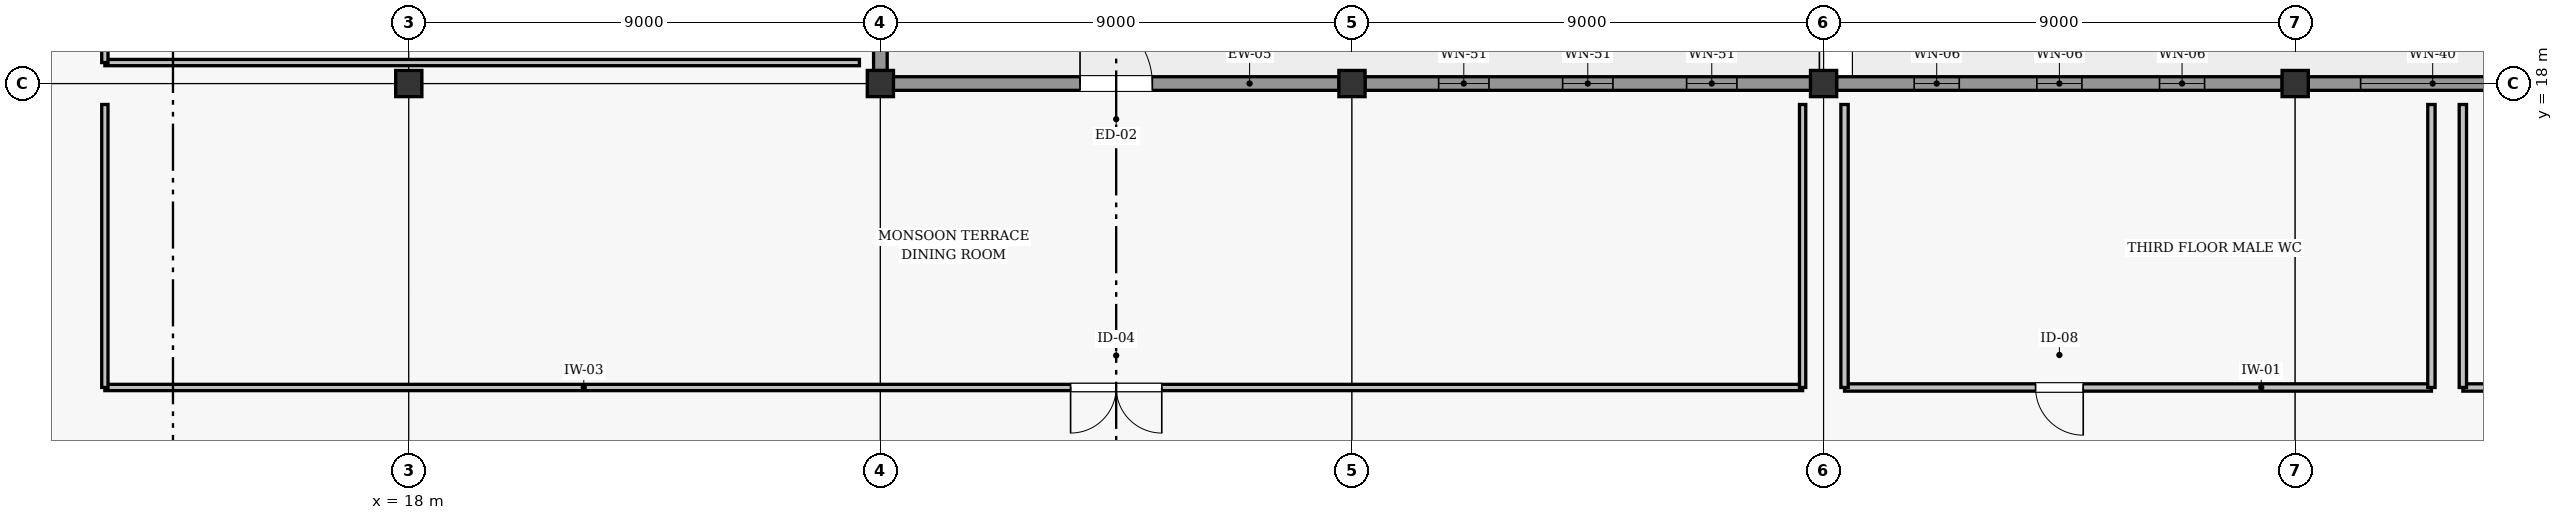
"""IFC4 building model, lengths in metres.
Left out: names, types, materials, properties, quantities, classifications, styles, units other than length and angle.
Written with IfcOpenShell. Run it as: python <this file> out.ifc"""

import sys

from ifc_helpers import new_model, si_unit, direction, frame, frame_2d, origin, origin_2d, place, context, subcontext, project, spatial, rectangle, extrude, element, fill, save


model = new_model("IFC4")
c1 = context("Model", 3, precision=1e-05, world=origin(), true_north=direction((0.0, 1.0)))
c2 = subcontext(c1, "Body", "Model", "MODEL_VIEW")
j1 = project(units=[si_unit("LENGTHUNIT", "METRE"), si_unit("PLANEANGLEUNIT", "RADIAN")], contexts=[c1])
p1 = place(None, origin())
s1 = spatial("IfcSite", under=j1, at=p1, CompositionType="ELEMENT")
p2 = place(p1, origin())
s2 = spatial("IfcBuilding", under=s1, at=p2, CompositionType="ELEMENT")
p3 = place(p2, frame((0.0, 0.0, 12.0)))
s3 = spatial("IfcBuildingStorey", under=s2, at=p3, CompositionType="ELEMENT", Elevation=12.0)
for number, where, z_axis, x_axis in (
    (1, (18.0, 18.0, 0.0), (0.0, 0.0, 1.0), (1.0, 0.0, 0.0)),
    (2, (27.0, 18.0, 0.0), (0.0, 0.0, 1.0), (1.0, 0.0, 0.0)),
    (3, (36.0, 18.0, 0.0), (0.0, 0.0, 1.0), (1.0, 0.0, 0.0)),
    (4, (45.0, 18.0, 0.0), (0.0, 0.0, 1.0), (1.0, 0.0, 0.0)),
    (5, (54.0, 18.0, 0.0), (0.0, 0.0, 1.0), (1.0, 0.0, 0.0)),
):
    element("IfcColumn", number, at=place(p3, frame(where, z_axis=z_axis, x_axis=x_axis)), inside=s3, PredefinedType="COLUMN", context=c2, shape_type="SweptSolid", body=[
        extrude(rectangle(XDim=0.5, YDim=0.5, at=origin_2d()), origin(), (0.0, 0.0, 1.0), 3.0),
    ])
p4 = place(p3, frame((27.248, 18.0, 0.0), z_axis=(0.0, 0.0, 1.0), x_axis=(1.0, 0.0, 0.0)))
e6 = element("IfcWall", 6, at=p4, inside=s3, PredefinedType="SOLIDWALL", context=c2, shape_type="SweptSolid", body=[
    extrude(rectangle(XDim=8.504, YDim=0.26, at=frame_2d((4.252, 0.0))), origin(), (0.0, 0.0, 1.0), 2.262),
])
p5 = place(p4, frame((3.562, 0.0, 0.0)))
e7 = element("IfcOpeningElement", 7, at=p5, cuts=e6, PredefinedType="OPENING", context=c2, shape_type="SweptSolid", body=[
    extrude(rectangle(XDim=1.38, YDim=2.04, at=frame_2d((0.69, 1.02))), frame((0.0, 0.14, 0.0), z_axis=(0.0, -1.0, 0.0), x_axis=(1.0, 0.0, 0.0)), (0.0, 0.0, 1.0), 0.28),
])
p6 = place(p3, frame((36.248, 18.0, 0.0), z_axis=(0.0, 0.0, 1.0), x_axis=(1.0, 0.0, 0.0)))
e8 = element("IfcWall", 8, at=p6, inside=s3, PredefinedType="SOLIDWALL", context=c2, shape_type="SweptSolid", body=[
    extrude(rectangle(XDim=8.504, YDim=0.26, at=frame_2d((4.252, 0.0))), origin(), (0.0, 0.0, 1.0), 2.262),
])
p7 = place(p6, frame((1.406, 0.0, 0.8)))
e9 = element("IfcOpeningElement", 9, at=p7, cuts=e8, PredefinedType="OPENING", context=c2, shape_type="SweptSolid", body=[
    extrude(rectangle(XDim=0.96, YDim=1.04, at=frame_2d((0.48, 0.52))), frame((0.0, 0.14, 0.0), z_axis=(0.0, -1.0, 0.0), x_axis=(1.0, 0.0, 0.0)), (0.0, 0.0, 1.0), 0.28),
])
p8 = place(p6, frame((3.772, 0.0, 0.8)))
e10 = element("IfcOpeningElement", 10, at=p8, cuts=e8, PredefinedType="OPENING", context=c2, shape_type="SweptSolid", body=[
    extrude(rectangle(XDim=0.96, YDim=1.04, at=frame_2d((0.48, 0.52))), frame((0.0, 0.14, 0.0), z_axis=(0.0, -1.0, 0.0), x_axis=(1.0, 0.0, 0.0)), (0.0, 0.0, 1.0), 0.28),
])
p9 = place(p6, frame((6.138, 0.0, 0.8)))
e11 = element("IfcOpeningElement", 11, at=p9, cuts=e8, PredefinedType="OPENING", context=c2, shape_type="SweptSolid", body=[
    extrude(rectangle(XDim=0.96, YDim=1.04, at=frame_2d((0.48, 0.52))), frame((0.0, 0.14, 0.0), z_axis=(0.0, -1.0, 0.0), x_axis=(1.0, 0.0, 0.0)), (0.0, 0.0, 1.0), 0.28),
])
p10 = place(p3, frame((45.248, 18.0, 0.0), z_axis=(0.0, 0.0, 1.0), x_axis=(1.0, 0.0, 0.0)))
e12 = element("IfcWall", 12, at=p10, inside=s3, PredefinedType="SOLIDWALL", context=c2, shape_type="SweptSolid", body=[
    extrude(rectangle(XDim=8.504, YDim=0.26, at=frame_2d((4.252, 0.0))), origin(), (0.0, 0.0, 1.0), 2.262),
])
p11 = place(p10, frame((1.481, 0.0, 0.85)))
e13 = element("IfcOpeningElement", 13, at=p11, cuts=e12, PredefinedType="OPENING", context=c2, shape_type="SweptSolid", body=[
    extrude(rectangle(XDim=0.86, YDim=0.98, at=frame_2d((0.43, 0.49))), frame((0.0, 0.14, 0.0), z_axis=(0.0, -1.0, 0.0), x_axis=(1.0, 0.0, 0.0)), (0.0, 0.0, 1.0), 0.28),
])
p12 = place(p10, frame((3.822, 0.0, 0.85)))
e14 = element("IfcOpeningElement", 14, at=p12, cuts=e12, PredefinedType="OPENING", context=c2, shape_type="SweptSolid", body=[
    extrude(rectangle(XDim=0.86, YDim=0.98, at=frame_2d((0.43, 0.49))), frame((0.0, 0.14, 0.0), z_axis=(0.0, -1.0, 0.0), x_axis=(1.0, 0.0, 0.0)), (0.0, 0.0, 1.0), 0.28),
])
p13 = place(p10, frame((6.163, 0.0, 0.85)))
e15 = element("IfcOpeningElement", 15, at=p13, cuts=e12, PredefinedType="OPENING", context=c2, shape_type="SweptSolid", body=[
    extrude(rectangle(XDim=0.86, YDim=0.98, at=frame_2d((0.43, 0.49))), frame((0.0, 0.14, 0.0), z_axis=(0.0, -1.0, 0.0), x_axis=(1.0, 0.0, 0.0)), (0.0, 0.0, 1.0), 0.28),
])
p14 = place(p3, frame((54.248, 18.0, 0.0), z_axis=(0.0, 0.0, 1.0), x_axis=(1.0, 0.0, 0.0)))
e16 = element("IfcWall", 16, at=p14, inside=s3, PredefinedType="SOLIDWALL", context=c2, shape_type="SweptSolid", body=[
    extrude(rectangle(XDim=8.504, YDim=0.26, at=frame_2d((4.252, 0.0))), origin(), (0.0, 0.0, 1.0), 2.322),
])
p15 = place(p14, frame((1.001, 0.0, 0.86)))
e17 = element("IfcOpeningElement", 17, at=p15, cuts=e16, PredefinedType="OPENING", context=c2, shape_type="SweptSolid", body=[
    extrude(rectangle(XDim=2.75, YDim=1.28, at=frame_2d((1.375, 0.64))), frame((0.0, 0.14, 0.0), z_axis=(0.0, -1.0, 0.0), x_axis=(1.0, 0.0, 0.0)), (0.0, 0.0, 1.0), 0.28),
])
p16 = place(p14, frame((4.753, 0.0, 0.86)))
e18 = element("IfcOpeningElement", 18, at=p16, cuts=e16, PredefinedType="OPENING", context=c2, shape_type="SweptSolid", body=[
    extrude(rectangle(XDim=2.75, YDim=1.28, at=frame_2d((1.375, 0.64))), frame((0.0, 0.14, 0.0), z_axis=(0.0, -1.0, 0.0), x_axis=(1.0, 0.0, 0.0)), (0.0, 0.0, 1.0), 0.28),
])
p17 = place(p3, frame((27.0, 18.248, 0.0), z_axis=(0.0, 0.0, 1.0), x_axis=(0.0, 1.0, 0.0)))
e19 = element("IfcWall", 19, at=p17, inside=s3, PredefinedType="SOLIDWALL", context=c2, shape_type="SweptSolid", body=[
    extrude(rectangle(XDim=8.504, YDim=0.26, at=frame_2d((4.252, 0.0))), origin(), (0.0, 0.0, 1.0), 2.302),
])
p18 = place(p17, frame((1.781, 0.0, 0.52)))
e20 = element("IfcOpeningElement", 20, at=p18, cuts=e19, PredefinedType="OPENING", context=c2, shape_type="SweptSolid", body=[
    extrude(rectangle(XDim=1.58, YDim=1.6, at=frame_2d((0.79, 0.8))), frame((0.0, 0.14, 0.0), z_axis=(0.0, -1.0, 0.0), x_axis=(1.0, 0.0, 0.0)), (0.0, 0.0, 1.0), 0.28),
])
p19 = place(p17, frame((5.143, 0.0, 0.52)))
e21 = element("IfcOpeningElement", 21, at=p19, cuts=e19, PredefinedType="OPENING", context=c2, shape_type="SweptSolid", body=[
    extrude(rectangle(XDim=1.58, YDim=1.6, at=frame_2d((0.79, 0.8))), frame((0.0, 0.14, 0.0), z_axis=(0.0, -1.0, 0.0), x_axis=(1.0, 0.0, 0.0)), (0.0, 0.0, 1.0), 0.28),
])
p20 = place(p3, frame((12.2, 12.2, 0.0), z_axis=(0.0, 0.0, 1.0), x_axis=(1.0, 0.0, 0.0)))
e22 = element("IfcWall", 22, at=p20, inside=s3, PredefinedType="PARTITIONING", context=c2, shape_type="SweptSolid", body=[
    extrude(rectangle(XDim=32.4, YDim=0.12, at=frame_2d((16.2, 0.0))), origin(), (0.0, 0.0, 1.0), 2.295),
])
p21 = place(p20, frame((18.43, 0.0, 0.0)))
e23 = element("IfcOpeningElement", 23, at=p21, cuts=e22, PredefinedType="OPENING", context=c2, shape_type="SweptSolid", body=[
    extrude(rectangle(XDim=1.74, YDim=2.18, at=frame_2d((0.87, 1.09))), frame((0.0, 0.07, 0.0), z_axis=(0.0, -1.0, 0.0), x_axis=(1.0, 0.0, 0.0)), (0.0, 0.0, 1.0), 0.14),
])
for number, where, z_axis, x_axis in (
    (24, (12.2, 12.2, 0.0), (0.0, 0.0, 1.0), (0.0, 1.0, 0.0)),
    (25, (44.6, 12.2, 0.0), (0.0, 0.0, 1.0), (0.0, 1.0, 0.0)),
):
    element("IfcWall", number, at=place(p3, frame(where, z_axis=z_axis, x_axis=x_axis)), inside=s3, PredefinedType="PARTITIONING", context=c2, shape_type="SweptSolid", body=[
        extrude(rectangle(XDim=5.4, YDim=0.12, at=frame_2d((2.7, 0.0))), origin(), (0.0, 0.0, 1.0), 2.75),
    ])
p22 = place(p3, frame((45.4, 12.2, 0.0), z_axis=(0.0, 0.0, 1.0), x_axis=(1.0, 0.0, 0.0)))
e26 = element("IfcWall", 26, at=p22, inside=s3, PredefinedType="PARTITIONING", context=c2, shape_type="SweptSolid", body=[
    extrude(rectangle(XDim=11.2, YDim=0.14, at=frame_2d((5.6, 0.0))), origin(), (0.0, 0.0, 1.0), 2.295),
])
p23 = place(p22, frame((3.645, 0.0, 0.0)))
e27 = element("IfcOpeningElement", 27, at=p23, cuts=e26, PredefinedType="OPENING", context=c2, shape_type="SweptSolid", body=[
    extrude(rectangle(XDim=0.91, YDim=2.04, at=frame_2d((0.455, 1.02))), frame((0.0, 0.08, 0.0), z_axis=(0.0, -1.0, 0.0), x_axis=(1.0, 0.0, 0.0)), (0.0, 0.0, 1.0), 0.16),
])
for number, where, z_axis, x_axis in (
    (28, (45.4, 12.2, 0.0), (0.0, 0.0, 1.0), (0.0, 1.0, 0.0)),
    (29, (56.6, 12.2, 0.0), (0.0, 0.0, 1.0), (0.0, 1.0, 0.0)),
):
    element("IfcWall", number, at=place(p3, frame(where, z_axis=z_axis, x_axis=x_axis)), inside=s3, PredefinedType="PARTITIONING", context=c2, shape_type="SweptSolid", body=[
        extrude(rectangle(XDim=5.4, YDim=0.14, at=frame_2d((2.7, 0.0))), origin(), (0.0, 0.0, 1.0), 2.75),
    ])
p24 = place(p3, frame((57.2, 12.2, 0.0), z_axis=(0.0, 0.0, 1.0), x_axis=(1.0, 0.0, 0.0)))
e30 = element("IfcWall", 30, at=p24, inside=s3, PredefinedType="PARTITIONING", context=c2, shape_type="SweptSolid", body=[
    extrude(rectangle(XDim=11.4, YDim=0.14, at=frame_2d((5.7, 0.0))), origin(), (0.0, 0.0, 1.0), 2.355),
])
p25 = place(p24, frame((2.845, 0.0, 0.0)))
e31 = element("IfcOpeningElement", 31, at=p25, cuts=e30, PredefinedType="OPENING", context=c2, shape_type="SweptSolid", body=[
    extrude(rectangle(XDim=0.91, YDim=2.04, at=frame_2d((0.455, 1.02))), frame((0.0, 0.08, 0.0), z_axis=(0.0, -1.0, 0.0), x_axis=(1.0, 0.0, 0.0)), (0.0, 0.0, 1.0), 0.16),
])
p26 = place(p3, frame((57.2, 12.2, 0.0), z_axis=(0.0, 0.0, 1.0), x_axis=(0.0, 1.0, 0.0)))
e32 = element("IfcWall", 32, at=p26, inside=s3, PredefinedType="PARTITIONING", context=c2, shape_type="SweptSolid", body=[
    extrude(rectangle(XDim=5.4, YDim=0.14, at=frame_2d((2.7, 0.0))), origin(), (0.0, 0.0, 1.0), 2.75),
])
p27 = place(p3, frame((12.2, 18.4, 0.0), z_axis=(0.0, 0.0, 1.0), x_axis=(1.0, 0.0, 0.0)))
e33 = element("IfcWall", 33, at=p27, inside=s3, PredefinedType="PARTITIONING", context=c2, shape_type="SweptSolid", body=[
    extrude(rectangle(XDim=14.4, YDim=0.12, at=frame_2d((7.2, 0.0))), origin(), (0.0, 0.0, 1.0), 2.245),
])
p28 = place(p3, frame((12.2, 18.4, 0.0), z_axis=(0.0, 0.0, 1.0), x_axis=(0.0, 1.0, 0.0)))
e34 = element("IfcWall", 34, at=p28, inside=s3, PredefinedType="PARTITIONING", context=c2, shape_type="SweptSolid", body=[
    extrude(rectangle(XDim=8.2, YDim=0.12, at=frame_2d((4.1, 0.0))), origin(), (0.0, 0.0, 1.0), 2.75),
])
p29 = place(p28, frame((3.61, 0.0, 0.0)))
e35 = element("IfcOpeningElement", 35, at=p29, cuts=e34, PredefinedType="OPENING", context=c2, shape_type="SweptSolid", body=[
    extrude(rectangle(XDim=0.98, YDim=2.08, at=frame_2d((0.49, 1.04))), frame((0.0, 0.07, 0.0), z_axis=(0.0, -1.0, 0.0), x_axis=(1.0, 0.0, 0.0)), (0.0, 0.0, 1.0), 0.14),
])
p30 = place(p5, origin())
e36 = element("IfcDoor", 36, at=p30, inside=s3, OperationType="SINGLE_SWING_LEFT", PredefinedType="DOOR", context=c2, shape_type="SweptSolid", body=[
    extrude(rectangle(XDim=1.38, YDim=2.04, at=frame_2d((0.69, 1.02))), frame((0.0, 0.025, 0.0), z_axis=(0.0, -1.0, 0.0), x_axis=(1.0, 0.0, 0.0)), (0.0, 0.0, 1.0), 0.05),
])
fill(e7, e36)
p31 = place(p7, origin())
e37 = element("IfcWindow", 37, at=p31, inside=s3, PartitioningType="SINGLE_PANEL", PredefinedType="WINDOW", context=c2, shape_type="SweptSolid", body=[
    extrude(rectangle(XDim=0.96, YDim=1.04, at=frame_2d((0.48, 0.52))), frame((0.0, 0.03, 0.0), z_axis=(0.0, -1.0, 0.0), x_axis=(1.0, 0.0, 0.0)), (0.0, 0.0, 1.0), 0.06),
])
fill(e9, e37)
p32 = place(p8, origin())
e38 = element("IfcWindow", 38, at=p32, inside=s3, PartitioningType="SINGLE_PANEL", PredefinedType="WINDOW", context=c2, shape_type="SweptSolid", body=[
    extrude(rectangle(XDim=0.96, YDim=1.04, at=frame_2d((0.48, 0.52))), frame((0.0, 0.03, 0.0), z_axis=(0.0, -1.0, 0.0), x_axis=(1.0, 0.0, 0.0)), (0.0, 0.0, 1.0), 0.06),
])
fill(e10, e38)
p33 = place(p9, origin())
e39 = element("IfcWindow", 39, at=p33, inside=s3, PartitioningType="SINGLE_PANEL", PredefinedType="WINDOW", context=c2, shape_type="SweptSolid", body=[
    extrude(rectangle(XDim=0.96, YDim=1.04, at=frame_2d((0.48, 0.52))), frame((0.0, 0.03, 0.0), z_axis=(0.0, -1.0, 0.0), x_axis=(1.0, 0.0, 0.0)), (0.0, 0.0, 1.0), 0.06),
])
fill(e11, e39)
p34 = place(p11, origin())
e40 = element("IfcWindow", 40, at=p34, inside=s3, PartitioningType="SINGLE_PANEL", PredefinedType="WINDOW", context=c2, shape_type="SweptSolid", body=[
    extrude(rectangle(XDim=0.86, YDim=0.98, at=frame_2d((0.43, 0.49))), frame((0.0, 0.03, 0.0), z_axis=(0.0, -1.0, 0.0), x_axis=(1.0, 0.0, 0.0)), (0.0, 0.0, 1.0), 0.06),
])
fill(e13, e40)
p35 = place(p12, origin())
e41 = element("IfcWindow", 41, at=p35, inside=s3, PartitioningType="SINGLE_PANEL", PredefinedType="WINDOW", context=c2, shape_type="SweptSolid", body=[
    extrude(rectangle(XDim=0.86, YDim=0.98, at=frame_2d((0.43, 0.49))), frame((0.0, 0.03, 0.0), z_axis=(0.0, -1.0, 0.0), x_axis=(1.0, 0.0, 0.0)), (0.0, 0.0, 1.0), 0.06),
])
fill(e14, e41)
p36 = place(p13, origin())
e42 = element("IfcWindow", 42, at=p36, inside=s3, PartitioningType="SINGLE_PANEL", PredefinedType="WINDOW", context=c2, shape_type="SweptSolid", body=[
    extrude(rectangle(XDim=0.86, YDim=0.98, at=frame_2d((0.43, 0.49))), frame((0.0, 0.03, 0.0), z_axis=(0.0, -1.0, 0.0), x_axis=(1.0, 0.0, 0.0)), (0.0, 0.0, 1.0), 0.06),
])
fill(e15, e42)
p37 = place(p15, origin())
e43 = element("IfcWindow", 43, at=p37, inside=s3, PartitioningType="SINGLE_PANEL", PredefinedType="WINDOW", context=c2, shape_type="SweptSolid", body=[
    extrude(rectangle(XDim=2.75, YDim=1.28, at=frame_2d((1.375, 0.64))), frame((0.0, 0.03, 0.0), z_axis=(0.0, -1.0, 0.0), x_axis=(1.0, 0.0, 0.0)), (0.0, 0.0, 1.0), 0.06),
])
fill(e17, e43)
p38 = place(p21, frame((1.74, 0.0, 0.0), z_axis=(0.0, 0.0, 1.0), x_axis=(-1.0, 0.0, 0.0)))
e44 = element("IfcDoor", 44, at=p38, inside=s3, OperationType="DOUBLE_SWING_LEFT", PredefinedType="DOOR", context=c2, shape_type="SweptSolid", body=[
    extrude(rectangle(XDim=1.74, YDim=2.18, at=frame_2d((0.87, 1.09))), frame((0.0, 0.025, 0.0), z_axis=(0.0, -1.0, 0.0), x_axis=(1.0, 0.0, 0.0)), (0.0, 0.0, 1.0), 0.05),
])
fill(e23, e44)
p39 = place(p23, frame((0.91, 0.0, 0.0), z_axis=(0.0, 0.0, 1.0), x_axis=(-1.0, 0.0, 0.0)))
e45 = element("IfcDoor", 45, at=p39, inside=s3, OperationType="SINGLE_SWING_RIGHT", PredefinedType="DOOR", context=c2, shape_type="SweptSolid", body=[
    extrude(rectangle(XDim=0.91, YDim=2.04, at=frame_2d((0.455, 1.02))), frame((0.0, 0.025, 0.0), z_axis=(0.0, -1.0, 0.0), x_axis=(1.0, 0.0, 0.0)), (0.0, 0.0, 1.0), 0.05),
])
fill(e27, e45)
save(model, sys.argv[1])
